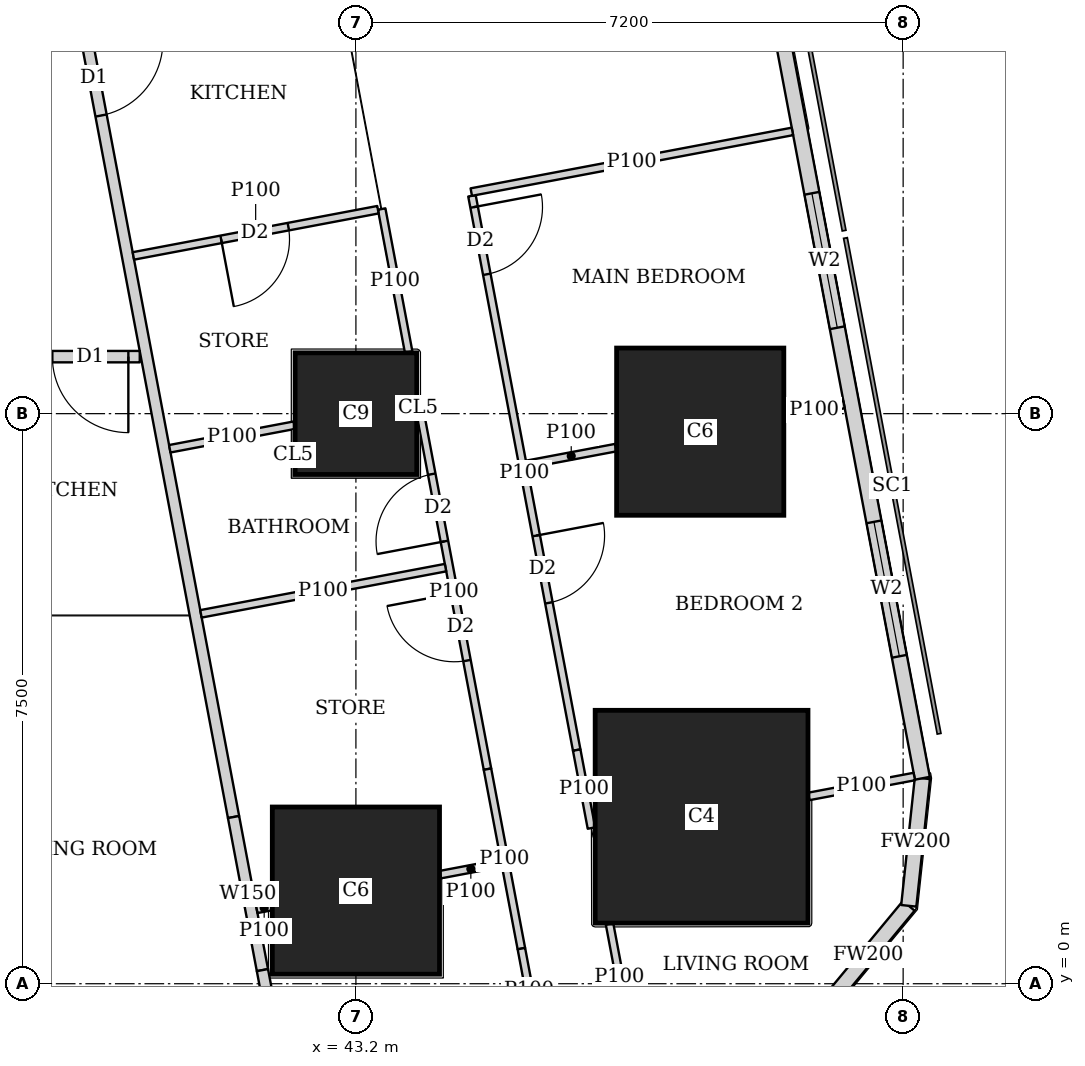
"""IFC4 building model, lengths in metres.
Left out: names, types, materials, properties, quantities, classifications, styles, units other than length and angle.
Written with IfcOpenShell. Run it as: python <this file> out.ifc"""

import sys

from ifc_helpers import new_model, si_unit, direction, frame, frame_2d, origin, origin_2d, place, context, subcontext, project, spatial, rectangle, extrude, element, fill, save


model = new_model("IFC4")
c1 = context("Model", 3, precision=1e-05, world=origin(), true_north=direction((0.0, 1.0)))
c2 = subcontext(c1, "Body", "Model", "MODEL_VIEW")
j1 = project(units=[si_unit("LENGTHUNIT", "METRE"), si_unit("PLANEANGLEUNIT", "RADIAN")], contexts=[c1])
p1 = place(None, origin())
s1 = spatial("IfcSite", under=j1, at=p1, CompositionType="ELEMENT")
p2 = place(p1, origin())
s2 = spatial("IfcBuilding", under=s1, at=p2, CompositionType="ELEMENT")
p3 = place(p2, frame((0.0, 0.0, 126.65)))
s3 = spatial("IfcBuildingStorey", under=s2, at=p3, CompositionType="ELEMENT", Elevation=126.65)
p4 = place(p3, frame((43.2, 1.225, 0.0), z_axis=(0.0, 0.0, 1.0), x_axis=(1.0, 0.0, 0.0)))
e1 = element("IfcColumn", 1, at=p4, inside=s3, PredefinedType="COLUMN", context=c2, shape_type="SweptSolid", body=[
    extrude(rectangle(XDim=2.2, YDim=2.2, at=origin_2d()), origin(), (0.0, 0.0, 1.0), 3.75),
])
p5 = place(p3, frame((47.748, 2.197, 0.0), z_axis=(0.0, 0.0, 1.0), x_axis=(1.0, 0.0, 0.0)))
e2 = element("IfcColumn", 2, at=p5, inside=s3, PredefinedType="COLUMN", context=c2, shape_type="SweptSolid", body=[
    extrude(rectangle(XDim=2.8, YDim=2.8, at=origin_2d()), origin(), (0.0, 0.0, 1.0), 3.75),
])
p6 = place(p3, frame((43.2, 7.5, 0.0), z_axis=(0.0, 0.0, 1.0), x_axis=(1.0, 0.0, 0.0)))
e3 = element("IfcColumn", 3, at=p6, inside=s3, PredefinedType="COLUMN", context=c2, shape_type="SweptSolid", body=[
    extrude(rectangle(XDim=1.6, YDim=1.6, at=origin_2d()), origin(), (0.0, 0.0, 1.0), 3.75),
])
p7 = place(p3, frame((47.73, 7.263, 0.0), z_axis=(0.0, 0.0, 1.0), x_axis=(1.0, 0.0, 0.0)))
e4 = element("IfcColumn", 4, at=p7, inside=s3, PredefinedType="COLUMN", context=c2, shape_type="SweptSolid", body=[
    extrude(rectangle(XDim=2.2, YDim=2.2, at=origin_2d()), origin(), (0.0, 0.0, 1.0), 3.75),
])
p8 = place(p3, frame((49.407, -0.263, 0.0), z_axis=(0.0, 0.0, 1.0), x_axis=(0.638042593423, 0.770001070764, 0.0)))
e5 = element("IfcWall", 5, at=p8, inside=s3, PredefinedType="SOLIDWALL", context=c2, shape_type="SweptSolid", body=[
    extrude(rectangle(XDim=1.673, YDim=0.2, at=frame_2d((0.836, 0.0))), origin(), (0.0, 0.0, 1.0), 3.45),
])
p9 = place(p3, frame((50.474, 1.025, 0.0), z_axis=(0.0, 0.0, 1.0), x_axis=(0.106047815515, 0.994361031429, 0.0)))
e6 = element("IfcWall", 6, at=p9, inside=s3, PredefinedType="SOLIDWALL", context=c2, shape_type="SweptSolid", body=[
    extrude(rectangle(XDim=1.688, YDim=0.2, at=frame_2d((0.844, 0.0))), origin(), (0.0, 0.0, 1.0), 3.45),
])
p10 = place(p3, frame((50.653, 2.703, 0.0), z_axis=(0.0, 0.0, 1.0), x_axis=(-0.185612026696, 0.982623109613, 0.0)))
e7 = element("IfcWall", 7, at=p10, inside=s3, PredefinedType="SOLIDWALL", context=c2, shape_type="SweptSolid", body=[
    extrude(rectangle(XDim=41.393, YDim=0.2, at=frame_2d((20.697, 0.0))), origin(), (0.0, 0.0, 1.0), 3.45),
])
p11 = place(p10, frame((1.633, 0.0, 0.9)))
e8 = element("IfcOpeningElement", 8, at=p11, cuts=e7, PredefinedType="OPENING", context=c2, shape_type="SweptSolid", body=[
    extrude(rectangle(XDim=1.8, YDim=1.5, at=frame_2d((0.9, 0.75))), frame((0.0, 0.11, 0.0), z_axis=(0.0, -1.0, 0.0), x_axis=(1.0, 0.0, 0.0)), (0.0, 0.0, 1.0), 0.22),
])
p12 = place(p10, frame((6.032, 0.0, 0.9)))
e9 = element("IfcOpeningElement", 9, at=p12, cuts=e7, PredefinedType="OPENING", context=c2, shape_type="SweptSolid", body=[
    extrude(rectangle(XDim=1.8, YDim=1.5, at=frame_2d((0.9, 0.75))), frame((0.0, 0.11, 0.0), z_axis=(0.0, -1.0, 0.0), x_axis=(1.0, 0.0, 0.0)), (0.0, 0.0, 1.0), 0.22),
])
p13 = place(p10, frame((9.848, 0.0, 0.9)))
e10 = element("IfcOpeningElement", 10, at=p13, cuts=e7, PredefinedType="OPENING", context=c2, shape_type="SweptSolid", body=[
    extrude(rectangle(XDim=1.8, YDim=1.5, at=frame_2d((0.9, 0.75))), frame((0.0, 0.11, 0.0), z_axis=(0.0, -1.0, 0.0), x_axis=(1.0, 0.0, 0.0)), (0.0, 0.0, 1.0), 0.22),
])
p14 = place(p10, frame((13.664, 0.0, 0.9)))
e11 = element("IfcOpeningElement", 11, at=p14, cuts=e7, PredefinedType="OPENING", context=c2, shape_type="SweptSolid", body=[
    extrude(rectangle(XDim=1.8, YDim=1.5, at=frame_2d((0.9, 0.75))), frame((0.0, 0.11, 0.0), z_axis=(0.0, -1.0, 0.0), x_axis=(1.0, 0.0, 0.0)), (0.0, 0.0, 1.0), 0.22),
])
p15 = place(p10, frame((17.481, 0.0, 0.9)))
e12 = element("IfcOpeningElement", 12, at=p15, cuts=e7, PredefinedType="OPENING", context=c2, shape_type="SweptSolid", body=[
    extrude(rectangle(XDim=1.8, YDim=1.5, at=frame_2d((0.9, 0.75))), frame((0.0, 0.11, 0.0), z_axis=(0.0, -1.0, 0.0), x_axis=(1.0, 0.0, 0.0)), (0.0, 0.0, 1.0), 0.22),
])
p16 = place(p10, frame((21.297, 0.0, 0.9)))
e13 = element("IfcOpeningElement", 13, at=p16, cuts=e7, PredefinedType="OPENING", context=c2, shape_type="SweptSolid", body=[
    extrude(rectangle(XDim=1.8, YDim=1.5, at=frame_2d((0.9, 0.75))), frame((0.0, 0.11, 0.0), z_axis=(0.0, -1.0, 0.0), x_axis=(1.0, 0.0, 0.0)), (0.0, 0.0, 1.0), 0.22),
])
p17 = place(p10, frame((25.113, 0.0, 0.9)))
e14 = element("IfcOpeningElement", 14, at=p17, cuts=e7, PredefinedType="OPENING", context=c2, shape_type="SweptSolid", body=[
    extrude(rectangle(XDim=1.8, YDim=1.5, at=frame_2d((0.9, 0.75))), frame((0.0, 0.11, 0.0), z_axis=(0.0, -1.0, 0.0), x_axis=(1.0, 0.0, 0.0)), (0.0, 0.0, 1.0), 0.22),
])
p18 = place(p10, frame((28.93, 0.0, 0.9)))
e15 = element("IfcOpeningElement", 15, at=p18, cuts=e7, PredefinedType="OPENING", context=c2, shape_type="SweptSolid", body=[
    extrude(rectangle(XDim=1.8, YDim=1.5, at=frame_2d((0.9, 0.75))), frame((0.0, 0.11, 0.0), z_axis=(0.0, -1.0, 0.0), x_axis=(1.0, 0.0, 0.0)), (0.0, 0.0, 1.0), 0.22),
])
p19 = place(p10, frame((32.746, 0.0, 0.9)))
e16 = element("IfcOpeningElement", 16, at=p19, cuts=e7, PredefinedType="OPENING", context=c2, shape_type="SweptSolid", body=[
    extrude(rectangle(XDim=1.8, YDim=1.5, at=frame_2d((0.9, 0.75))), frame((0.0, 0.11, 0.0), z_axis=(0.0, -1.0, 0.0), x_axis=(1.0, 0.0, 0.0)), (0.0, 0.0, 1.0), 0.22),
])
p20 = place(p10, frame((36.481, 0.0, 0.9)))
e17 = element("IfcOpeningElement", 17, at=p20, cuts=e7, PredefinedType="OPENING", context=c2, shape_type="SweptSolid", body=[
    extrude(rectangle(XDim=1.8, YDim=1.5, at=frame_2d((0.9, 0.75))), frame((0.0, 0.11, 0.0), z_axis=(0.0, -1.0, 0.0), x_axis=(1.0, 0.0, 0.0)), (0.0, 0.0, 1.0), 0.22),
])
p21 = place(p3, frame((40.356, 8.25, 0.0), z_axis=(0.0, 0.0, 1.0), x_axis=(-1.0, 0.0, 0.0)))
e18 = element("IfcWall", 18, at=p21, inside=s3, PredefinedType="SOLIDWALL", context=c2, shape_type="SweptSolid", body=[
    extrude(rectangle(XDim=3.555, YDim=0.15, at=frame_2d((1.777, 0.0))), origin(), (0.0, 0.0, 1.0), 3.45),
])
p22 = place(p21, frame((0.15, 0.0, 0.0)))
e19 = element("IfcOpeningElement", 19, at=p22, cuts=e18, PredefinedType="OPENING", context=c2, shape_type="SweptSolid", body=[
    extrude(rectangle(XDim=1.0, YDim=2.1, at=frame_2d((0.5, 1.05))), frame((0.0, 0.085, 0.0), z_axis=(0.0, -1.0, 0.0), x_axis=(1.0, 0.0, 0.0)), (0.0, 0.0, 1.0), 0.17),
])
p23 = place(p3, frame((33.896, 42.929, 0.0), z_axis=(0.0, 0.0, 1.0), x_axis=(0.1855961604, -0.982626106535, 0.0)))
e20 = element("IfcWall", 20, at=p23, inside=s3, PredefinedType="SOLIDWALL", context=c2, shape_type="SweptSolid", body=[
    extrude(rectangle(XDim=41.456, YDim=0.15, at=frame_2d((20.728, 0.0))), origin(), (0.0, 0.0, 1.0), 2.45),
])
p24 = place(p23, frame((7.893, 0.0, 0.0)))
e21 = element("IfcOpeningElement", 21, at=p24, cuts=e20, PredefinedType="OPENING", context=c2, shape_type="SweptSolid", body=[
    extrude(rectangle(XDim=1.0, YDim=2.1, at=frame_2d((0.5, 1.05))), frame((0.0, 0.085, 0.0), z_axis=(0.0, -1.0, 0.0), x_axis=(1.0, 0.0, 0.0)), (0.0, 0.0, 1.0), 0.17),
])
p25 = place(p23, frame((12.468, 0.0, 0.0)))
e22 = element("IfcOpeningElement", 22, at=p25, cuts=e20, PredefinedType="OPENING", context=c2, shape_type="SweptSolid", body=[
    extrude(rectangle(XDim=1.0, YDim=2.1, at=frame_2d((0.5, 1.05))), frame((0.0, 0.085, 0.0), z_axis=(0.0, -1.0, 0.0), x_axis=(1.0, 0.0, 0.0)), (0.0, 0.0, 1.0), 0.17),
])
p26 = place(p23, frame((20.101, 0.0, 0.0)))
e23 = element("IfcOpeningElement", 23, at=p26, cuts=e20, PredefinedType="OPENING", context=c2, shape_type="SweptSolid", body=[
    extrude(rectangle(XDim=1.0, YDim=2.1, at=frame_2d((0.5, 1.05))), frame((0.0, 0.085, 0.0), z_axis=(0.0, -1.0, 0.0), x_axis=(1.0, 0.0, 0.0)), (0.0, 0.0, 1.0), 0.17),
])
p27 = place(p23, frame((31.064, 0.0, 0.0)))
e24 = element("IfcOpeningElement", 24, at=p27, cuts=e20, PredefinedType="OPENING", context=c2, shape_type="SweptSolid", body=[
    extrude(rectangle(XDim=1.0, YDim=2.1, at=frame_2d((0.5, 1.05))), frame((0.0, 0.085, 0.0), z_axis=(0.0, -1.0, 0.0), x_axis=(1.0, 0.0, 0.0)), (0.0, 0.0, 1.0), 0.17),
])
p28 = place(p3, frame((41.59, 2.193, 0.0), z_axis=(0.0, 0.0, 1.0), x_axis=(0.185338414215, -0.982674754034, 0.0)))
e25 = element("IfcWall", 25, at=p28, inside=s3, PredefinedType="SOLIDWALL", context=c2, shape_type="SweptSolid", body=[
    extrude(rectangle(XDim=2.05, YDim=0.15, at=frame_2d((1.025, 0.0))), origin(), (0.0, 0.0, 1.0), 2.15),
])
p29 = place(p3, frame((41.97, 0.179, 0.0), z_axis=(0.0, 0.0, 1.0), x_axis=(0.186088003244, -0.982533080893, 0.0)))
e26 = element("IfcWall", 26, at=p29, inside=s3, PredefinedType="SOLIDWALL", context=c2, shape_type="SweptSolid", body=[
    extrude(rectangle(XDim=0.844, YDim=0.15, at=frame_2d((0.422, 0.0))), origin(), (0.0, 0.0, 1.0), 3.45),
])
p30 = place(p3, frame((44.727, 10.366, 0.0), z_axis=(0.0, 0.0, 1.0), x_axis=(0.185678775129, -0.982610498858, 0.0)))
e27 = element("IfcWall", 27, at=p30, inside=s3, PredefinedType="PARTITIONING", context=c2, shape_type="SweptSolid", body=[
    extrude(rectangle(XDim=7.421, YDim=0.1, at=frame_2d((3.71, 0.0))), origin(), (0.0, 0.0, 1.0), 3.45),
])
p31 = place(p30, frame((0.151, 0.0, 0.0)))
e28 = element("IfcOpeningElement", 28, at=p31, cuts=e27, PredefinedType="OPENING", context=c2, shape_type="SweptSolid", body=[
    extrude(rectangle(XDim=0.9, YDim=2.1, at=frame_2d((0.45, 1.05))), frame((0.0, 0.06, 0.0), z_axis=(0.0, -1.0, 0.0), x_axis=(1.0, 0.0, 0.0)), (0.0, 0.0, 1.0), 0.12),
])
p32 = place(p30, frame((4.55, 0.0, 0.0)))
e29 = element("IfcOpeningElement", 29, at=p32, cuts=e27, PredefinedType="OPENING", context=c2, shape_type="SweptSolid", body=[
    extrude(rectangle(XDim=0.9, YDim=2.1, at=frame_2d((0.45, 1.05))), frame((0.0, 0.06, 0.0), z_axis=(0.0, -1.0, 0.0), x_axis=(1.0, 0.0, 0.0)), (0.0, 0.0, 1.0), 0.12),
])
p33 = place(p3, frame((46.105, 3.074, 0.0), z_axis=(0.0, 0.0, 1.0), x_axis=(0.185897769544, -0.982569091351, 0.0)))
e30 = element("IfcWall", 30, at=p33, inside=s3, PredefinedType="PARTITIONING", context=c2, shape_type="SweptSolid", body=[
    extrude(rectangle(XDim=1.044, YDim=0.1, at=frame_2d((0.522, 0.0))), origin(), (0.0, 0.0, 1.0), 2.0),
])
p34 = place(p3, frame((46.537, 0.787, 0.0), z_axis=(0.0, 0.0, 1.0), x_axis=(0.185348284603, -0.982672892368, 0.0)))
e31 = element("IfcWall", 31, at=p34, inside=s3, PredefinedType="PARTITIONING", context=c2, shape_type="SweptSolid", body=[
    extrude(rectangle(XDim=1.419, YDim=0.1, at=frame_2d((0.709, 0.0))), origin(), (0.0, 0.0, 1.0), 2.0),
])
p35 = place(p3, frame((43.539, 10.192, 0.0), z_axis=(0.0, 0.0, 1.0), x_axis=(0.185366049966, -0.982669541362, 0.0)))
e32 = element("IfcWall", 32, at=p35, inside=s3, PredefinedType="PARTITIONING", context=c2, shape_type="SweptSolid", body=[
    extrude(rectangle(XDim=1.915, YDim=0.1, at=frame_2d((0.958, 0.0))), origin(), (0.0, 0.0, 1.0), 3.45),
])
p36 = place(p3, frame((44.049, 7.49, 0.0), z_axis=(0.0, 0.0, 1.0), x_axis=(0.185666332607, -0.982612849975, 0.0)))
e33 = element("IfcWall", 33, at=p36, inside=s3, PredefinedType="PARTITIONING", context=c2, shape_type="SweptSolid", body=[
    extrude(rectangle(XDim=4.75, YDim=0.1, at=frame_2d((2.375, 0.0))), origin(), (0.0, 0.0, 1.0), 3.45),
])
p37 = place(p36, frame((0.8, 0.0, 0.0)))
e34 = element("IfcOpeningElement", 34, at=p37, cuts=e33, PredefinedType="OPENING", context=c2, shape_type="SweptSolid", body=[
    extrude(rectangle(XDim=0.9, YDim=2.1, at=frame_2d((0.45, 1.05))), frame((0.0, 0.06, 0.0), z_axis=(0.0, -1.0, 0.0), x_axis=(1.0, 0.0, 0.0)), (0.0, 0.0, 1.0), 0.12),
])
p38 = place(p36, frame((2.396, 0.0, 0.0)))
e35 = element("IfcOpeningElement", 35, at=p38, cuts=e33, PredefinedType="OPENING", context=c2, shape_type="SweptSolid", body=[
    extrude(rectangle(XDim=0.9, YDim=2.1, at=frame_2d((0.45, 1.05))), frame((0.0, 0.06, 0.0), z_axis=(0.0, -1.0, 0.0), x_axis=(1.0, 0.0, 0.0)), (0.0, 0.0, 1.0), 0.12),
])
p39 = place(p3, frame((44.931, 2.823, 0.0), z_axis=(0.0, 0.0, 1.0), x_axis=(0.185631845838, -0.982619365681, 0.0)))
e36 = element("IfcWall", 36, at=p39, inside=s3, PredefinedType="PARTITIONING", context=c2, shape_type="SweptSolid", body=[
    extrude(rectangle(XDim=2.403, YDim=0.1, at=frame_2d((1.201, 0.0))), origin(), (0.0, 0.0, 1.0), 2.0),
])
p40 = place(p3, frame((45.377, 0.462, 0.0), z_axis=(0.0, 0.0, 1.0), x_axis=(0.185513480919, -0.982641719243, 0.0)))
e37 = element("IfcWall", 37, at=p40, inside=s3, PredefinedType="PARTITIONING", context=c2, shape_type="SweptSolid", body=[
    extrude(rectangle(XDim=1.095, YDim=0.1, at=frame_2d((0.547, 0.0))), origin(), (0.0, 0.0, 1.0), 3.45),
])
p41 = place(p3, frame((48.943, 11.213, 0.0), z_axis=(0.0, 0.0, 1.0), x_axis=(-0.982633535512, -0.185556823879, 0.0)))
e38 = element("IfcWall", 38, at=p41, inside=s3, PredefinedType="PARTITIONING", context=c2, shape_type="SweptSolid", body=[
    extrude(rectangle(XDim=4.3, YDim=0.1, at=frame_2d((2.15, 0.0))), origin(), (0.0, 0.0, 1.0), 2.15),
])
p42 = place(p3, frame((49.622, 7.62, 0.0), z_axis=(0.0, 0.0, 1.0), x_axis=(-0.982512656401, -0.186195810938, 0.0)))
e39 = element("IfcWall", 39, at=p42, inside=s3, PredefinedType="PARTITIONING", context=c2, shape_type="SweptSolid", body=[
    extrude(rectangle(XDim=0.796, YDim=0.1, at=frame_2d((0.398, 0.0))), origin(), (0.0, 0.0, 1.0), 2.0),
])
p43 = place(p3, frame((46.62, 7.053, 0.0), z_axis=(0.0, 0.0, 1.0), x_axis=(-0.982749355621, -0.18494243436, 0.0)))
e40 = element("IfcWall", 40, at=p43, inside=s3, PredefinedType="PARTITIONING", context=c2, shape_type="SweptSolid", body=[
    extrude(rectangle(XDim=1.195, YDim=0.1, at=frame_2d((0.597, 0.0))), origin(), (0.0, 0.0, 1.0), 2.0),
])
p44 = place(p3, frame((50.547, 2.726, 0.0), z_axis=(0.0, 0.0, 1.0), x_axis=(-0.982680053146, -0.185310315822, 0.0)))
e41 = element("IfcWall", 41, at=p44, inside=s3, PredefinedType="PARTITIONING", context=c2, shape_type="SweptSolid", body=[
    extrude(rectangle(XDim=1.414, YDim=0.1, at=frame_2d((0.707, 0.0))), origin(), (0.0, 0.0, 1.0), 3.45),
])
p45 = place(p3, frame((43.49, 10.183, 0.0), z_axis=(0.0, 0.0, 1.0), x_axis=(-0.982607026909, -0.185697147715, 0.0)))
e42 = element("IfcWall", 42, at=p45, inside=s3, PredefinedType="PARTITIONING", context=c2, shape_type="SweptSolid", body=[
    extrude(rectangle(XDim=3.275, YDim=0.1, at=frame_2d((1.637, 0.0))), origin(), (0.0, 0.0, 1.0), 3.45),
])
p46 = place(p45, frame((1.2, 0.0, 0.0)))
e43 = element("IfcOpeningElement", 43, at=p46, cuts=e42, PredefinedType="OPENING", context=c2, shape_type="SweptSolid", body=[
    extrude(rectangle(XDim=0.9, YDim=2.1, at=frame_2d((0.45, 1.05))), frame((0.0, 0.06, 0.0), z_axis=(0.0, -1.0, 0.0), x_axis=(1.0, 0.0, 0.0)), (0.0, 0.0, 1.0), 0.12),
])
p47 = place(p3, frame((42.39, 7.348, 0.0), z_axis=(0.0, 0.0, 1.0), x_axis=(-0.9825976927, -0.185746532405, 0.0)))
e44 = element("IfcWall", 44, at=p47, inside=s3, PredefinedType="PARTITIONING", context=c2, shape_type="SweptSolid", body=[
    extrude(rectangle(XDim=1.668, YDim=0.1, at=frame_2d((0.834, 0.0))), origin(), (0.0, 0.0, 1.0), 3.45),
])
p48 = place(p3, frame((45.114, 1.587, 0.0), z_axis=(0.0, 0.0, 1.0), x_axis=(-0.982624706348, -0.185603573443, 0.0)))
e45 = element("IfcWall", 45, at=p48, inside=s3, PredefinedType="PARTITIONING", context=c2, shape_type="SweptSolid", body=[
    extrude(rectangle(XDim=0.818, YDim=0.1, at=frame_2d((0.409, 0.0))), origin(), (0.0, 0.0, 1.0), 2.0),
])
p49 = place(p3, frame((42.09, 1.016, 0.0), z_axis=(0.0, 0.0, 1.0), x_axis=(-0.982208563973, -0.187793335502, 0.0)))
e46 = element("IfcWall", 46, at=p49, inside=s3, PredefinedType="PARTITIONING", context=c2, shape_type="SweptSolid", body=[
    extrude(rectangle(XDim=0.198, YDim=0.1, at=frame_2d((0.099, 0.0))), origin(), (0.0, 0.0, 1.0), 2.0),
])
p50 = place(p3, frame((44.379, 5.474, 0.0), z_axis=(0.0, 0.0, 1.0), x_axis=(-0.982607026909, -0.185697147715, 0.0)))
e47 = element("IfcWall", 47, at=p50, inside=s3, PredefinedType="PARTITIONING", context=c2, shape_type="SweptSolid", body=[
    extrude(rectangle(XDim=3.275, YDim=0.1, at=frame_2d((1.637, 0.0))), origin(), (0.0, 0.0, 1.0), 3.45),
])
p51 = place(p11, origin())
e48 = element("IfcWindow", 48, at=p51, inside=s3, PartitioningType="SINGLE_PANEL", PredefinedType="WINDOW", context=c2, shape_type="SweptSolid", body=[
    extrude(rectangle(XDim=1.8, YDim=1.5, at=frame_2d((0.9, 0.75))), frame((0.0, 0.03, 0.0), z_axis=(0.0, -1.0, 0.0), x_axis=(1.0, 0.0, 0.0)), (0.0, 0.0, 1.0), 0.06),
])
fill(e8, e48)
p52 = place(p12, origin())
e49 = element("IfcWindow", 49, at=p52, inside=s3, PartitioningType="SINGLE_PANEL", PredefinedType="WINDOW", context=c2, shape_type="SweptSolid", body=[
    extrude(rectangle(XDim=1.8, YDim=1.5, at=frame_2d((0.9, 0.75))), frame((0.0, 0.03, 0.0), z_axis=(0.0, -1.0, 0.0), x_axis=(1.0, 0.0, 0.0)), (0.0, 0.0, 1.0), 0.06),
])
fill(e9, e49)
p53 = place(p22, origin())
e50 = element("IfcDoor", 50, at=p53, inside=s3, OperationType="SINGLE_SWING_LEFT", PredefinedType="DOOR", context=c2, shape_type="SweptSolid", body=[
    extrude(rectangle(XDim=1.0, YDim=2.1, at=frame_2d((0.5, 1.05))), frame((0.0, 0.025, 0.0), z_axis=(0.0, -1.0, 0.0), x_axis=(1.0, 0.0, 0.0)), (0.0, 0.0, 1.0), 0.05),
])
fill(e19, e50)
p54 = place(p31, origin())
e51 = element("IfcDoor", 51, at=p54, inside=s3, OperationType="SINGLE_SWING_LEFT", PredefinedType="DOOR", context=c2, shape_type="SweptSolid", body=[
    extrude(rectangle(XDim=0.9, YDim=2.1, at=frame_2d((0.45, 1.05))), frame((0.0, 0.025, 0.0), z_axis=(0.0, -1.0, 0.0), x_axis=(1.0, 0.0, 0.0)), (0.0, 0.0, 1.0), 0.05),
])
fill(e28, e51)
p55 = place(p32, origin())
e52 = element("IfcDoor", 52, at=p55, inside=s3, OperationType="SINGLE_SWING_LEFT", PredefinedType="DOOR", context=c2, shape_type="SweptSolid", body=[
    extrude(rectangle(XDim=0.9, YDim=2.1, at=frame_2d((0.45, 1.05))), frame((0.0, 0.025, 0.0), z_axis=(0.0, -1.0, 0.0), x_axis=(1.0, 0.0, 0.0)), (0.0, 0.0, 1.0), 0.05),
])
fill(e29, e52)
p56 = place(p37, origin())
e53 = element("IfcDoor", 53, at=p56, inside=s3, OperationType="SINGLE_SWING_LEFT", PredefinedType="DOOR", context=c2, shape_type="SweptSolid", body=[
    extrude(rectangle(XDim=0.9, YDim=2.1, at=frame_2d((0.45, 1.05))), frame((0.0, 0.025, 0.0), z_axis=(0.0, -1.0, 0.0), x_axis=(1.0, 0.0, 0.0)), (0.0, 0.0, 1.0), 0.05),
])
fill(e34, e53)
p57 = place(p38, origin())
e54 = element("IfcDoor", 54, at=p57, inside=s3, OperationType="SINGLE_SWING_RIGHT", PredefinedType="DOOR", context=c2, shape_type="SweptSolid", body=[
    extrude(rectangle(XDim=0.9, YDim=2.1, at=frame_2d((0.45, 1.05))), frame((0.0, 0.025, 0.0), z_axis=(0.0, -1.0, 0.0), x_axis=(1.0, 0.0, 0.0)), (0.0, 0.0, 1.0), 0.05),
])
fill(e35, e54)
p58 = place(p27, origin())
e55 = element("IfcDoor", 55, at=p58, inside=s3, OperationType="SINGLE_SWING_LEFT", PredefinedType="DOOR", context=c2, shape_type="SweptSolid", body=[
    extrude(rectangle(XDim=1.0, YDim=2.1, at=frame_2d((0.5, 1.05))), frame((0.0, 0.025, 0.0), z_axis=(0.0, -1.0, 0.0), x_axis=(1.0, 0.0, 0.0)), (0.0, 0.0, 1.0), 0.05),
])
fill(e24, e55)
p59 = place(p46, origin())
e56 = element("IfcDoor", 56, at=p59, inside=s3, OperationType="SINGLE_SWING_RIGHT", PredefinedType="DOOR", context=c2, shape_type="SweptSolid", body=[
    extrude(rectangle(XDim=0.9, YDim=2.1, at=frame_2d((0.45, 1.05))), frame((0.0, 0.025, 0.0), z_axis=(0.0, -1.0, 0.0), x_axis=(1.0, 0.0, 0.0)), (0.0, 0.0, 1.0), 0.05),
])
fill(e43, e56)
save(model, sys.argv[1])
